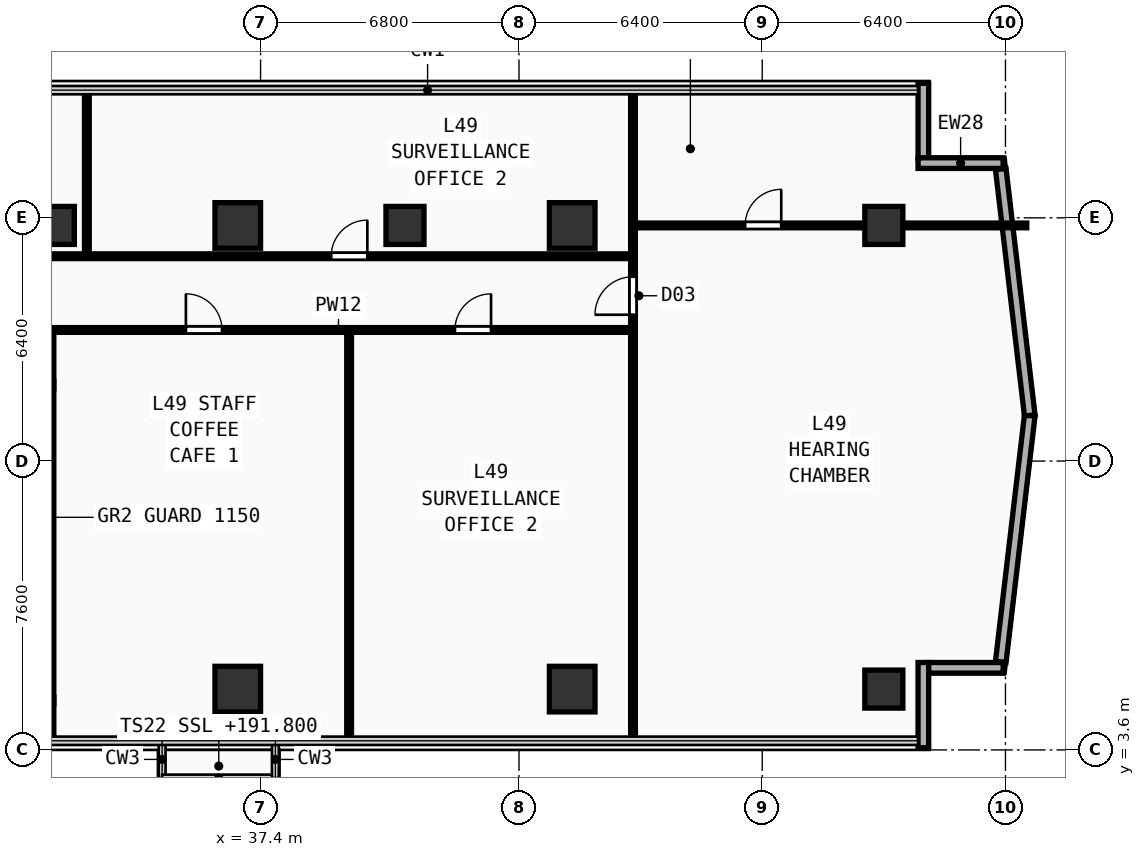
"""IFC4 building model, lengths in metres.
Left out: names, types, materials, properties, quantities, classifications, styles, units other than length and angle.
Written with IfcOpenShell. Run it as: python <this file> out.ifc"""

import sys

from ifc_helpers import new_model, si_unit, direction, frame, frame_2d, origin, origin_2d, place, context, subcontext, project, spatial, rectangle, extrude, element, fill, save


model = new_model("IFC4")
c1 = context("Model", 3, precision=1e-05, world=origin(), true_north=direction((0.0, 1.0)))
c2 = subcontext(c1, "Body", "Model", "MODEL_VIEW")
j1 = project(units=[si_unit("LENGTHUNIT", "METRE"), si_unit("PLANEANGLEUNIT", "RADIAN")], contexts=[c1])
p1 = place(None, origin())
s1 = spatial("IfcSite", under=j1, at=p1, CompositionType="ELEMENT")
p2 = place(p1, origin())
s2 = spatial("IfcBuilding", under=s1, at=p2, CompositionType="ELEMENT")
p3 = place(p2, frame((0.0, 0.0, 191.8)))
s3 = spatial("IfcBuildingStorey", under=s2, at=p3, CompositionType="ELEMENT", Elevation=191.8)
for number, where, z_axis, x_axis in (
    (1, (36.8, 5.2, 0.0), (0.0, 0.0, 1.0), (1.0, 0.0, 0.0)),
    (2, (45.6, 5.2, 0.0), (0.0, 0.0, 1.0), (1.0, 0.0, 0.0)),
    (3, (36.8, 17.4, 0.0), (0.0, 0.0, 1.0), (1.0, 0.0, 0.0)),
    (4, (45.6, 17.4, 0.0), (0.0, 0.0, 1.0), (1.0, 0.0, 0.0)),
):
    element("IfcColumn", number, at=place(p3, frame(where, z_axis=z_axis, x_axis=x_axis)), inside=s3, PredefinedType="COLUMN", context=c2, shape_type="SweptSolid", body=[
        extrude(rectangle(XDim=1.2, YDim=1.2, at=origin_2d()), origin(), (0.0, 0.0, 1.0), 3.56),
    ])
for number, where, z_axis, x_axis in (
    (5, (53.8, 5.2, 0.0), (0.0, 0.0, 1.0), (1.0, 0.0, 0.0)),
    (6, (53.8, 17.4, 0.0), (0.0, 0.0, 1.0), (1.0, 0.0, 0.0)),
    (7, (32.0, 17.4, 0.0), (0.0, 0.0, 1.0), (1.0, 0.0, 0.0)),
    (8, (41.2, 17.4, 0.0), (0.0, 0.0, 1.0), (1.0, 0.0, 0.0)),
):
    element("IfcColumn", number, at=place(p3, frame(where, z_axis=z_axis, x_axis=x_axis)), inside=s3, PredefinedType="COLUMN", context=c2, shape_type="SweptSolid", body=[
        extrude(rectangle(XDim=1.0, YDim=1.0, at=origin_2d()), origin(), (0.0, 0.0, 1.0), 3.56),
    ])
p4 = place(p3, frame((54.84, 3.66, 0.0), z_axis=(0.0, 0.0, 1.0), x_axis=(0.0, 1.0, 0.0)))
e9 = element("IfcWall", 9, at=p4, inside=s3, PredefinedType="SOLIDWALL", context=c2, shape_type="SweptSolid", body=[
    extrude(rectangle(XDim=2.24, YDim=0.28, at=frame_2d((1.12, 0.0))), origin(), (0.0, 0.0, 1.0), 3.56),
])
p5 = place(p3, frame((54.98, 5.76, 0.0), z_axis=(0.0, 0.0, 1.0), x_axis=(1.0, 0.0, 0.0)))
e10 = element("IfcWall", 10, at=p5, inside=s3, PredefinedType="SOLIDWALL", context=c2, shape_type="SweptSolid", body=[
    extrude(rectangle(XDim=1.96, YDim=0.28, at=frame_2d((0.98, 0.0))), origin(), (0.0, 0.0, 1.0), 3.56),
])
p6 = place(p3, frame((54.84, 19.165, 0.0), z_axis=(0.0, 0.0, 1.0), x_axis=(0.0, 1.0, 0.0)))
e11 = element("IfcWall", 11, at=p6, inside=s3, PredefinedType="SOLIDWALL", context=c2, shape_type="SweptSolid", body=[
    extrude(rectangle(XDim=1.975, YDim=0.28, at=frame_2d((0.987, 0.0))), origin(), (0.0, 0.0, 1.0), 3.56),
])
p7 = place(p3, frame((54.7, 19.04, 0.0), z_axis=(0.0, 0.0, 1.0), x_axis=(1.0, 0.0, 0.0)))
e12 = element("IfcWall", 12, at=p7, inside=s3, PredefinedType="SOLIDWALL", context=c2, shape_type="SweptSolid", body=[
    extrude(rectangle(XDim=2.24, YDim=0.28, at=frame_2d((1.12, 0.0))), origin(), (0.0, 0.0, 1.0), 3.56),
])
for number, where, z_axis, x_axis in (
    (13, (56.876, 5.917, 0.0), (0.0, 0.0, 1.0), (0.117, 0.993, 0.0)),
    (14, (57.639, 12.401, 0.0), (0.0, 0.0, 1.0), (-0.117, 0.993, 0.0)),
):
    element("IfcWall", number, at=place(p3, frame(where, z_axis=z_axis, x_axis=x_axis)), inside=s3, PredefinedType="SOLIDWALL", context=c2, shape_type="SweptSolid", body=[
        extrude(rectangle(XDim=6.527, YDim=0.28, at=frame_2d((3.263, 0.0))), origin(), (0.0, 0.0, 1.0), 3.56),
    ])
p8 = place(p3, frame((31.86, 3.84, 0.0), z_axis=(0.0, 0.0, 1.0), x_axis=(0.0, 1.0, 0.0)))
e15 = element("IfcWall", 15, at=p8, inside=s3, PredefinedType="SHEAR", context=c2, shape_type="SweptSolid", body=[
    extrude(rectangle(XDim=10.81, YDim=0.2, at=frame_2d((5.405, 0.0))), origin(), (0.0, 0.0, 1.0), 3.56),
])
p9 = place(p3, frame((27.8, 4.9, 0.0), z_axis=(0.0, 0.0, 1.0), x_axis=(1.0, 0.0, 0.0)))
e16 = element("IfcWall", 16, at=p9, inside=s3, PredefinedType="SHEAR", context=c2, shape_type="SweptSolid", body=[
    extrude(rectangle(XDim=4.16, YDim=0.2, at=frame_2d((2.08, 0.0))), origin(), (0.0, 0.0, 1.0), 3.56),
])
p10 = place(p3, frame((27.8, 13.2, 0.0), z_axis=(0.0, 0.0, 1.0), x_axis=(1.0, 0.0, 0.0)))
e17 = element("IfcWall", 17, at=p10, inside=s3, PredefinedType="SHEAR", context=c2, shape_type="SweptSolid", body=[
    extrude(rectangle(XDim=4.16, YDim=0.2, at=frame_2d((2.08, 0.0))), origin(), (0.0, 0.0, 1.0), 3.56),
])
p11 = place(p10, frame((1.53, 0.0, 0.0)))
e18 = element("IfcOpeningElement", 18, at=p11, cuts=e17, PredefinedType="OPENING", context=c2, shape_type="SweptSolid", body=[
    extrude(rectangle(XDim=1.1, YDim=2.2, at=frame_2d((0.55, 1.1))), frame((0.0, 0.11, 0.0), z_axis=(0.0, -1.0, 0.0), x_axis=(1.0, 0.0, 0.0)), (0.0, 0.0, 1.0), 0.22),
])
p12 = place(p3, frame((31.95, 14.65, 0.0), z_axis=(0.0, 0.0, 1.0), x_axis=(1.0, 0.0, 0.0)))
e19 = element("IfcWall", 19, at=p12, inside=s3, PredefinedType="PARTITIONING", context=c2, shape_type="SweptSolid", body=[
    extrude(rectangle(XDim=15.25, YDim=0.125, at=frame_2d((7.625, 0.0))), origin(), (0.0, 0.0, 1.0), 3.56),
])
p13 = place(p12, frame((3.485, 0.0, 0.0)))
e20 = element("IfcOpeningElement", 20, at=p13, cuts=e19, PredefinedType="OPENING", context=c2, shape_type="SweptSolid", body=[
    extrude(rectangle(XDim=0.95, YDim=2.15, at=frame_2d((0.475, 1.075))), frame((0.0, 0.073, 0.0), z_axis=(0.0, -1.0, 0.0), x_axis=(1.0, 0.0, 0.0)), (0.0, 0.0, 1.0), 0.145),
])
p14 = place(p12, frame((10.565, 0.0, 0.0)))
e21 = element("IfcOpeningElement", 21, at=p14, cuts=e19, PredefinedType="OPENING", context=c2, shape_type="SweptSolid", body=[
    extrude(rectangle(XDim=0.95, YDim=2.15, at=frame_2d((0.475, 1.075))), frame((0.0, 0.073, 0.0), z_axis=(0.0, -1.0, 0.0), x_axis=(1.0, 0.0, 0.0)), (0.0, 0.0, 1.0), 0.145),
])
p15 = place(p3, frame((39.73, 3.84, 0.0), z_axis=(0.0, 0.0, 1.0), x_axis=(0.0, 1.0, 0.0)))
e22 = element("IfcWall", 22, at=p15, inside=s3, PredefinedType="PARTITIONING", context=c2, shape_type="SweptSolid", body=[
    extrude(rectangle(XDim=10.81, YDim=0.125, at=frame_2d((5.405, 0.0))), origin(), (0.0, 0.0, 1.0), 3.56),
])
p16 = place(p3, frame((47.2, 3.84, 0.0), z_axis=(0.0, 0.0, 1.0), x_axis=(0.0, 1.0, 0.0)))
e23 = element("IfcWall", 23, at=p16, inside=s3, PredefinedType="PARTITIONING", context=c2, shape_type="SweptSolid", body=[
    extrude(rectangle(XDim=17.12, YDim=0.125, at=frame_2d((8.56, 0.0))), origin(), (0.0, 0.0, 1.0), 3.56),
])
p17 = place(p16, frame((11.21, 0.0, 0.0)))
e24 = element("IfcOpeningElement", 24, at=p17, cuts=e23, PredefinedType="OPENING", context=c2, shape_type="SweptSolid", body=[
    extrude(rectangle(XDim=1.0, YDim=2.2, at=frame_2d((0.5, 1.1))), frame((0.0, 0.073, 0.0), z_axis=(0.0, -1.0, 0.0), x_axis=(1.0, 0.0, 0.0)), (0.0, 0.0, 1.0), 0.145),
])
p18 = place(p3, frame((47.2, 17.4, 0.0), z_axis=(0.0, 0.0, 1.0), x_axis=(1.0, 0.0, 0.0)))
e25 = element("IfcWall", 25, at=p18, inside=s3, PredefinedType="PARTITIONING", context=c2, shape_type="SweptSolid", body=[
    extrude(rectangle(XDim=10.36, YDim=0.125, at=frame_2d((5.18, 0.0))), origin(), (0.0, 0.0, 1.0), 3.26),
])
p19 = place(p18, frame((2.95, 0.0, 0.0)))
e26 = element("IfcOpeningElement", 26, at=p19, cuts=e25, PredefinedType="OPENING", context=c2, shape_type="SweptSolid", body=[
    extrude(rectangle(XDim=0.95, YDim=2.15, at=frame_2d((0.475, 1.075))), frame((0.0, 0.073, 0.0), z_axis=(0.0, -1.0, 0.0), x_axis=(1.0, 0.0, 0.0)), (0.0, 0.0, 1.0), 0.145),
])
p20 = place(p3, frame((23.65, 16.59, 0.0), z_axis=(0.0, 0.0, 1.0), x_axis=(1.0, 0.0, 0.0)))
e27 = element("IfcWall", 27, at=p20, inside=s3, PredefinedType="PARTITIONING", context=c2, shape_type="SweptSolid", body=[
    extrude(rectangle(XDim=23.55, YDim=0.125, at=frame_2d((11.775, 0.0))), origin(), (0.0, 0.0, 1.0), 3.56),
])
p21 = place(p20, frame((4.606, 0.0, 0.0)))
e28 = element("IfcOpeningElement", 28, at=p21, cuts=e27, PredefinedType="OPENING", context=c2, shape_type="SweptSolid", body=[
    extrude(rectangle(XDim=0.95, YDim=2.15, at=frame_2d((0.475, 1.075))), frame((0.0, 0.073, 0.0), z_axis=(0.0, -1.0, 0.0), x_axis=(1.0, 0.0, 0.0)), (0.0, 0.0, 1.0), 0.145),
])
p22 = place(p20, frame((15.61, 0.0, 0.0)))
e29 = element("IfcOpeningElement", 29, at=p22, cuts=e27, PredefinedType="OPENING", context=c2, shape_type="SweptSolid", body=[
    extrude(rectangle(XDim=0.95, YDim=2.15, at=frame_2d((0.475, 1.075))), frame((0.0, 0.073, 0.0), z_axis=(0.0, -1.0, 0.0), x_axis=(1.0, 0.0, 0.0)), (0.0, 0.0, 1.0), 0.145),
])
p23 = place(p3, frame((32.83, 16.59, 0.0), z_axis=(0.0, 0.0, 1.0), x_axis=(0.0, 1.0, 0.0)))
e30 = element("IfcWall", 30, at=p23, inside=s3, PredefinedType="PARTITIONING", context=c2, shape_type="SweptSolid", body=[
    extrude(rectangle(XDim=4.37, YDim=0.125, at=frame_2d((2.185, 0.0))), origin(), (0.0, 0.0, 1.0), 3.56),
])
p24 = place(p13, origin())
e31 = element("IfcDoor", 31, at=p24, inside=s3, OperationType="SINGLE_SWING_LEFT", PredefinedType="DOOR", context=c2, shape_type="SweptSolid", body=[
    extrude(rectangle(XDim=0.95, YDim=2.15, at=frame_2d((0.475, 1.075))), frame((0.0, 0.025, 0.0), z_axis=(0.0, -1.0, 0.0), x_axis=(1.0, 0.0, 0.0)), (0.0, 0.0, 1.0), 0.05),
])
fill(e20, e31)
p25 = place(p14, origin())
e32 = element("IfcDoor", 32, at=p25, inside=s3, OperationType="SINGLE_SWING_RIGHT", PredefinedType="DOOR", context=c2, shape_type="SweptSolid", body=[
    extrude(rectangle(XDim=0.95, YDim=2.15, at=frame_2d((0.475, 1.075))), frame((0.0, 0.025, 0.0), z_axis=(0.0, -1.0, 0.0), x_axis=(1.0, 0.0, 0.0)), (0.0, 0.0, 1.0), 0.05),
])
fill(e21, e32)
p26 = place(p17, origin())
e33 = element("IfcDoor", 33, at=p26, inside=s3, OperationType="SINGLE_SWING_LEFT", PredefinedType="DOOR", context=c2, shape_type="SweptSolid", body=[
    extrude(rectangle(XDim=1.0, YDim=2.2, at=frame_2d((0.5, 1.1))), frame((0.0, 0.025, 0.0), z_axis=(0.0, -1.0, 0.0), x_axis=(1.0, 0.0, 0.0)), (0.0, 0.0, 1.0), 0.05),
])
fill(e24, e33)
p27 = place(p19, origin())
e34 = element("IfcDoor", 34, at=p27, inside=s3, OperationType="SINGLE_SWING_RIGHT", PredefinedType="DOOR", context=c2, shape_type="SweptSolid", body=[
    extrude(rectangle(XDim=0.95, YDim=2.15, at=frame_2d((0.475, 1.075))), frame((0.0, 0.025, 0.0), z_axis=(0.0, -1.0, 0.0), x_axis=(1.0, 0.0, 0.0)), (0.0, 0.0, 1.0), 0.05),
])
fill(e26, e34)
p28 = place(p22, origin())
e35 = element("IfcDoor", 35, at=p28, inside=s3, OperationType="SINGLE_SWING_RIGHT", PredefinedType="DOOR", context=c2, shape_type="SweptSolid", body=[
    extrude(rectangle(XDim=0.95, YDim=2.15, at=frame_2d((0.475, 1.075))), frame((0.0, 0.025, 0.0), z_axis=(0.0, -1.0, 0.0), x_axis=(1.0, 0.0, 0.0)), (0.0, 0.0, 1.0), 0.05),
])
fill(e29, e35)
save(model, sys.argv[1])
